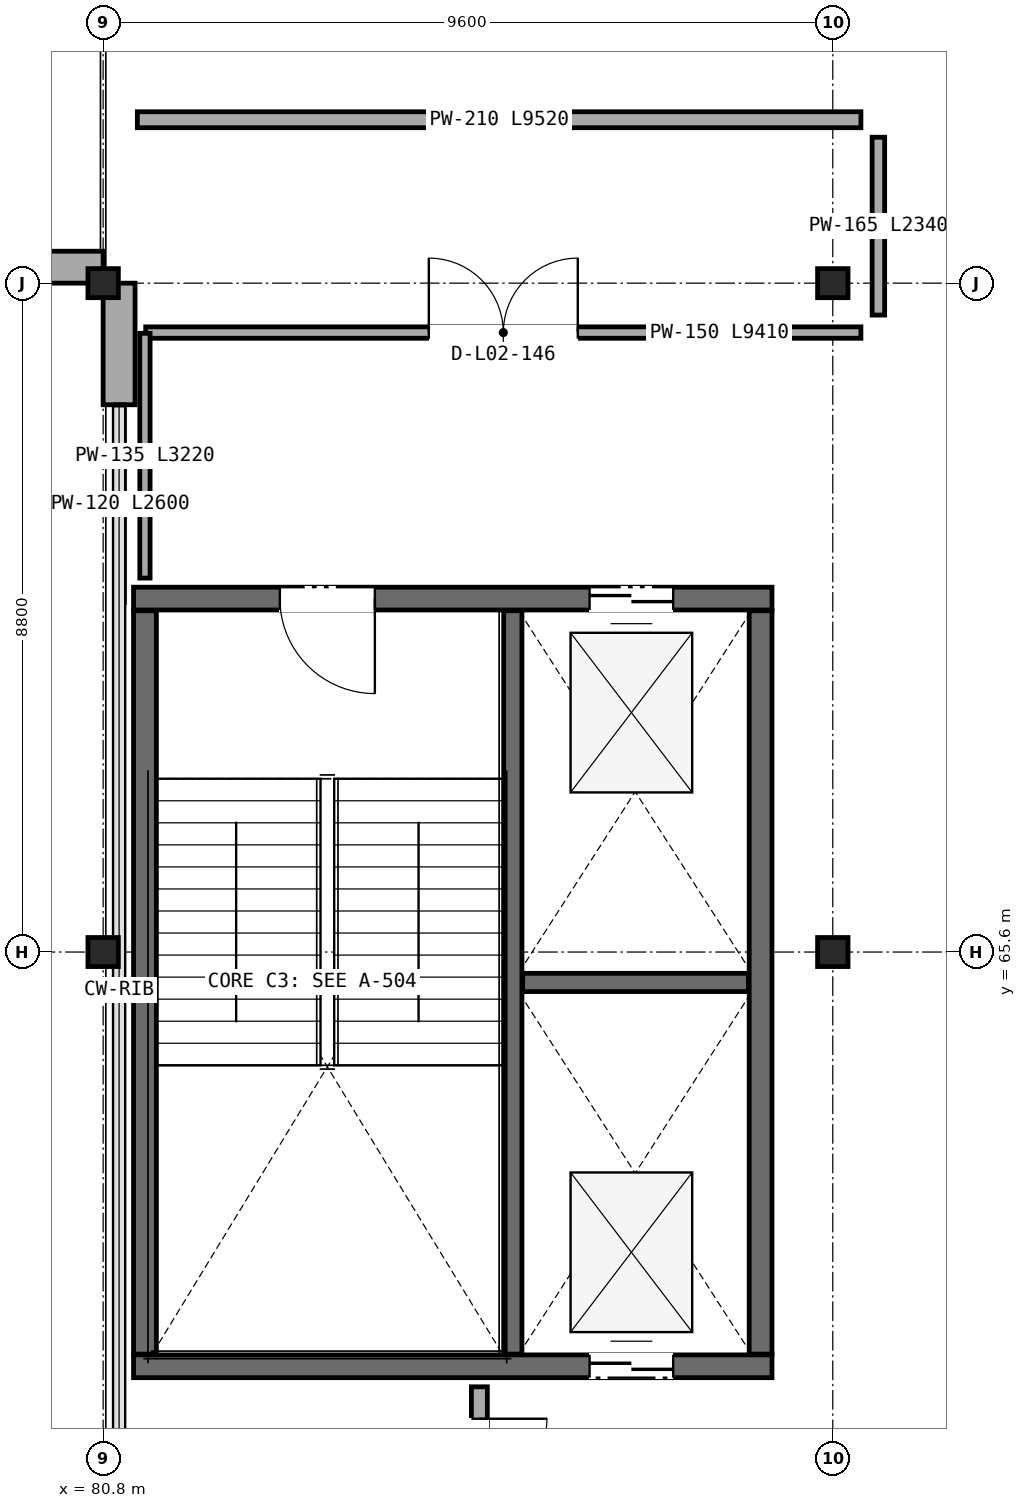
"""IFC4 building model, lengths in metres.
Left out: names, types, materials, properties, quantities, classifications, styles, units other than length and angle.
Written with IfcOpenShell. Run it as: python <this file> out.ifc"""

import sys

from ifc_helpers import new_model, si_unit, direction, frame, frame_2d, origin, origin_2d, place, context, subcontext, project, spatial, rectangle, i_section, extrude, element, fill, save


model = new_model("IFC4")
c1 = context("Model", 3, precision=1e-05, world=origin(), true_north=direction((0.0, 1.0)))
c2 = subcontext(c1, "Body", "Model", "MODEL_VIEW")
j1 = project(units=[si_unit("LENGTHUNIT", "METRE"), si_unit("PLANEANGLEUNIT", "RADIAN")], contexts=[c1])
p1 = place(None, origin())
s1 = spatial("IfcSite", under=j1, at=p1, CompositionType="ELEMENT")
p2 = place(p1, origin())
s2 = spatial("IfcBuilding", under=s1, at=p2, CompositionType="ELEMENT")
p3 = place(p2, frame((0.0, 0.0, 10.1)))
s3 = spatial("IfcBuildingStorey", under=s2, at=p3, CompositionType="ELEMENT", Elevation=10.1)
for number, where, z_axis, x_axis in (
    (1, (90.4, 65.6, 0.0), (0.0, 0.0, 1.0), (1.0, 0.0, 0.0)),
    (2, (90.4, 74.4, 0.0), (0.0, 0.0, 1.0), (1.0, 0.0, 0.0)),
    (3, (80.8, 65.6, 0.0), (0.0, 0.0, 1.0), (1.0, 0.0, 0.0)),
    (4, (80.8, 74.4, 0.0), (0.0, 0.0, 1.0), (1.0, 0.0, 0.0)),
):
    element("IfcColumn", number, at=place(p3, frame(where, z_axis=z_axis, x_axis=x_axis)), inside=s3, PredefinedType="COLUMN", context=c2, shape_type="SweptSolid", body=[
        extrude(i_section(OverallWidth=0.4, OverallDepth=0.382, WebThickness=0.025, FlangeThickness=0.036, at=origin_2d()), origin(), (0.0, 0.0, 1.0), 4.5),
    ])
p4 = place(p3, frame((42.4, 74.61, 0.0), z_axis=(0.0, 0.0, 1.0), x_axis=(1.0, 0.0, 0.0)))
e5 = element("IfcWall", 5, at=p4, inside=s3, PredefinedType="SOLIDWALL", context=c2, shape_type="SweptSolid", body=[
    extrude(rectangle(XDim=38.4, YDim=0.42, at=frame_2d((19.2, 0.0))), origin(), (0.0, 0.0, 1.0), 3.588),
])
p5 = place(p4, frame((1.8, 0.0, 0.9)))
e6 = element("IfcOpeningElement", 6, at=p5, cuts=e5, PredefinedType="OPENING", context=c2, shape_type="SweptSolid", body=[
    extrude(rectangle(XDim=2.2, YDim=2.15, at=frame_2d((1.1, 1.075))), frame((0.0, 0.22, 0.0), z_axis=(0.0, -1.0, 0.0), x_axis=(1.0, 0.0, 0.0)), (0.0, 0.0, 1.0), 0.44),
])
p6 = place(p4, frame((6.4, 0.0, 0.9)))
e7 = element("IfcOpeningElement", 7, at=p6, cuts=e5, PredefinedType="OPENING", context=c2, shape_type="SweptSolid", body=[
    extrude(rectangle(XDim=2.52, YDim=2.15, at=frame_2d((1.26, 1.075))), frame((0.0, 0.22, 0.0), z_axis=(0.0, -1.0, 0.0), x_axis=(1.0, 0.0, 0.0)), (0.0, 0.0, 1.0), 0.44),
])
p7 = place(p4, frame((11.0, 0.0, 0.9)))
e8 = element("IfcOpeningElement", 8, at=p7, cuts=e5, PredefinedType="OPENING", context=c2, shape_type="SweptSolid", body=[
    extrude(rectangle(XDim=2.65, YDim=2.15, at=frame_2d((1.325, 1.075))), frame((0.0, 0.22, 0.0), z_axis=(0.0, -1.0, 0.0), x_axis=(1.0, 0.0, 0.0)), (0.0, 0.0, 1.0), 0.44),
])
p8 = place(p4, frame((15.6, 0.0, 0.75)))
e9 = element("IfcOpeningElement", 9, at=p8, cuts=e5, PredefinedType="OPENING", context=c2, shape_type="SweptSolid", body=[
    extrude(rectangle(XDim=0.95, YDim=2.5, at=frame_2d((0.475, 1.25))), frame((0.0, 0.22, 0.0), z_axis=(0.0, -1.0, 0.0), x_axis=(1.0, 0.0, 0.0)), (0.0, 0.0, 1.0), 0.44),
])
p9 = place(p4, frame((20.2, 0.0, 0.75)))
e10 = element("IfcOpeningElement", 10, at=p9, cuts=e5, PredefinedType="OPENING", context=c2, shape_type="SweptSolid", body=[
    extrude(rectangle(XDim=1.1, YDim=2.5, at=frame_2d((0.55, 1.25))), frame((0.0, 0.22, 0.0), z_axis=(0.0, -1.0, 0.0), x_axis=(1.0, 0.0, 0.0)), (0.0, 0.0, 1.0), 0.44),
])
p10 = place(p4, frame((24.8, 0.0, 0.75)))
e11 = element("IfcOpeningElement", 11, at=p10, cuts=e5, PredefinedType="OPENING", context=c2, shape_type="SweptSolid", body=[
    extrude(rectangle(XDim=1.25, YDim=2.5, at=frame_2d((0.625, 1.25))), frame((0.0, 0.22, 0.0), z_axis=(0.0, -1.0, 0.0), x_axis=(1.0, 0.0, 0.0)), (0.0, 0.0, 1.0), 0.44),
])
p11 = place(p3, frame((81.01, 74.4, 0.0), z_axis=(0.0, 0.0, 1.0), x_axis=(0.0, -1.0, 0.0)))
e12 = element("IfcWall", 12, at=p11, inside=s3, PredefinedType="SOLIDWALL", context=c2, shape_type="SweptSolid", body=[
    extrude(rectangle(XDim=1.6, YDim=0.42, at=frame_2d((0.8, 0.0))), origin(), (0.0, 0.0, 1.0), 3.628),
])
p12 = place(p3, frame((81.2, 60.15, 0.0), z_axis=(0.0, 0.0, 1.0), x_axis=(1.0, 0.0, 0.0)))
e13 = element("IfcWall", 13, at=p12, inside=s3, PredefinedType="SHEAR", context=c2, shape_type="SweptSolid", body=[
    extrude(rectangle(XDim=8.4, YDim=0.3, at=frame_2d((4.2, 0.0))), origin(), (0.0, 0.0, 1.0), 4.245),
])
p13 = place(p12, frame((6.0, 0.0, 0.0)))
e14 = element("IfcOpeningElement", 14, at=p13, cuts=e13, PredefinedType="OPENING", context=c2, shape_type="SweptSolid", body=[
    extrude(rectangle(XDim=1.1, YDim=2.2, at=frame_2d((0.55, 1.1))), frame((0.0, 0.16, 0.0), z_axis=(0.0, -1.0, 0.0), x_axis=(1.0, 0.0, 0.0)), (0.0, 0.0, 1.0), 0.32),
])
p14 = place(p3, frame((89.6, 70.25, 0.0), z_axis=(0.0, 0.0, 1.0), x_axis=(-1.0, 0.0, 0.0)))
e15 = element("IfcWall", 15, at=p14, inside=s3, PredefinedType="SHEAR", context=c2, shape_type="SweptSolid", body=[
    extrude(rectangle(XDim=8.4, YDim=0.3, at=frame_2d((4.2, 0.0))), origin(), (0.0, 0.0, 1.0), 4.245),
])
p15 = place(p14, frame((5.225, 0.0, 0.0)))
e16 = element("IfcOpeningElement", 16, at=p15, cuts=e15, PredefinedType="OPENING", context=c2, shape_type="SweptSolid", body=[
    extrude(rectangle(XDim=1.25, YDim=2.2, at=frame_2d((0.625, 1.1))), frame((0.0, 0.16, 0.0), z_axis=(0.0, -1.0, 0.0), x_axis=(1.0, 0.0, 0.0)), (0.0, 0.0, 1.0), 0.32),
])
p16 = place(p14, frame((1.3, 0.0, 0.0)))
e17 = element("IfcOpeningElement", 17, at=p16, cuts=e15, PredefinedType="OPENING", context=c2, shape_type="SweptSolid", body=[
    extrude(rectangle(XDim=1.1, YDim=2.2, at=frame_2d((0.55, 1.1))), frame((0.0, 0.16, 0.0), z_axis=(0.0, -1.0, 0.0), x_axis=(1.0, 0.0, 0.0)), (0.0, 0.0, 1.0), 0.32),
])
for number, where, z_axis, x_axis in (
    (18, (89.45, 60.31, 0.0), (0.0, 0.0, 1.0), (0.0, 1.0, 0.0)),
    (19, (81.35, 70.09, 0.0), (0.0, 0.0, 1.0), (0.0, -1.0, 0.0)),
):
    element("IfcWall", number, at=place(p3, frame(where, z_axis=z_axis, x_axis=x_axis)), inside=s3, PredefinedType="SHEAR", context=c2, shape_type="SweptSolid", body=[
        extrude(rectangle(XDim=9.78, YDim=0.3, at=frame_2d((4.89, 0.0))), origin(), (0.0, 0.0, 1.0), 4.245),
    ])
p17 = place(p3, frame((86.19, 60.31, 0.0), z_axis=(0.0, 0.0, 1.0), x_axis=(0.0, 1.0, 0.0)))
e20 = element("IfcWall", 20, at=p17, inside=s3, PredefinedType="SOLIDWALL", context=c2, shape_type="SweptSolid", body=[
    extrude(rectangle(XDim=9.78, YDim=0.24, at=frame_2d((4.89, 0.0))), origin(), (0.0, 0.0, 1.0), 4.245),
])
p18 = place(p3, frame((86.32, 65.2, 0.0), z_axis=(0.0, 0.0, 1.0), x_axis=(1.0, 0.0, 0.0)))
e21 = element("IfcWall", 21, at=p18, inside=s3, PredefinedType="SOLIDWALL", context=c2, shape_type="SweptSolid", body=[
    extrude(rectangle(XDim=2.97, YDim=0.24, at=frame_2d((1.485, 0.0))), origin(), (0.0, 0.0, 1.0), 4.245),
])
p19 = place(p3, frame((85.75, 59.88, 0.0), z_axis=(0.0, 0.0, 1.0), x_axis=(0.0, -1.0, 0.0)))
e22 = element("IfcWall", 22, at=p19, inside=s3, PredefinedType="PARTITIONING", context=c2, shape_type="SweptSolid", body=[
    extrude(rectangle(XDim=2.62, YDim=0.21, at=frame_2d((1.31, 0.0))), origin(), (0.0, 0.0, 1.0), 4.13),
])
p20 = place(p19, frame((0.42, 0.0, 0.0)))
e23 = element("IfcOpeningElement", 23, at=p20, cuts=e22, PredefinedType="OPENING", context=c2, shape_type="SweptSolid", body=[
    extrude(rectangle(XDim=1.78, YDim=2.46, at=frame_2d((0.89, 1.23))), frame((0.0, 0.115, 0.0), z_axis=(0.0, -1.0, 0.0), x_axis=(1.0, 0.0, 0.0)), (0.0, 0.0, 1.0), 0.23),
])
p21 = place(p3, frame((91.0, 76.32, 0.0), z_axis=(0.0, 0.0, 1.0), x_axis=(0.0, -1.0, 0.0)))
e24 = element("IfcWall", 24, at=p21, inside=s3, PredefinedType="PARTITIONING", context=c2, shape_type="SweptSolid", body=[
    extrude(rectangle(XDim=2.34, YDim=0.165, at=frame_2d((1.17, 0.0))), origin(), (0.0, 0.0, 1.0), 4.13),
])
p22 = place(p3, frame((90.77, 73.75, 0.0), z_axis=(0.0, 0.0, 1.0), x_axis=(-1.0, 0.0, 0.0)))
e25 = element("IfcWall", 25, at=p22, inside=s3, PredefinedType="PARTITIONING", context=c2, shape_type="SweptSolid", body=[
    extrude(rectangle(XDim=9.41, YDim=0.15, at=frame_2d((4.705, 0.0))), origin(), (0.0, 0.0, 1.0), 3.763),
])
p23 = place(p22, frame((3.725, 0.0, 0.0)))
e26 = element("IfcOpeningElement", 26, at=p23, cuts=e25, PredefinedType="OPENING", context=c2, shape_type="SweptSolid", body=[
    extrude(rectangle(XDim=1.96, YDim=2.46, at=frame_2d((0.98, 1.23))), frame((0.0, 0.085, 0.0), z_axis=(0.0, -1.0, 0.0), x_axis=(1.0, 0.0, 0.0)), (0.0, 0.0, 1.0), 0.17),
])
p24 = place(p3, frame((81.35, 73.74, 0.0), z_axis=(0.0, 0.0, 1.0), x_axis=(0.0, -1.0, 0.0)))
e27 = element("IfcWall", 27, at=p24, inside=s3, PredefinedType="PARTITIONING", context=c2, shape_type="SweptSolid", body=[
    extrude(rectangle(XDim=3.22, YDim=0.135, at=frame_2d((1.61, 0.0))), origin(), (0.0, 0.0, 1.0), 4.13),
])
p25 = place(p3, frame((81.02, 70.2, 0.0), z_axis=(0.0, 0.0, 1.0), x_axis=(0.0, 1.0, 0.0)))
e28 = element("IfcWall", 28, at=p25, inside=s3, PredefinedType="PARTITIONING", context=c2, shape_type="SweptSolid", body=[
    extrude(rectangle(XDim=2.6, YDim=0.12, at=frame_2d((1.3, 0.0))), origin(), (0.0, 0.0, 1.0), 2.9),
])
p26 = place(p3, frame((81.25, 76.55, 0.0), z_axis=(0.0, 0.0, 1.0), x_axis=(1.0, 0.0, 0.0)))
e29 = element("IfcWall", 29, at=p26, inside=s3, PredefinedType="PARTITIONING", context=c2, shape_type="SweptSolid", body=[
    extrude(rectangle(XDim=9.52, YDim=0.21, at=frame_2d((4.76, 0.0))), origin(), (0.0, 0.0, 1.0), 3.763),
])
p27 = place(p15, origin())
e30 = element("IfcDoor", 30, at=p27, inside=s3, OperationType="SINGLE_SWING_LEFT", PredefinedType="DOOR", context=c2, shape_type="SweptSolid", body=[
    extrude(rectangle(XDim=1.25, YDim=2.2, at=frame_2d((0.625, 1.1))), frame((0.0, 0.025, 0.0), z_axis=(0.0, -1.0, 0.0), x_axis=(1.0, 0.0, 0.0)), (0.0, 0.0, 1.0), 0.05),
])
fill(e16, e30)
p28 = place(p13, origin())
e31 = element("IfcDoor", 31, at=p28, inside=s3, OperationType="DOUBLE_DOOR_SLIDING", PredefinedType="DOOR", context=c2, shape_type="SweptSolid", body=[
    extrude(rectangle(XDim=1.1, YDim=2.2, at=frame_2d((0.55, 1.1))), frame((0.0, 0.025, 0.0), z_axis=(0.0, -1.0, 0.0), x_axis=(1.0, 0.0, 0.0)), (0.0, 0.0, 1.0), 0.05),
])
fill(e14, e31)
p29 = place(p16, origin())
e32 = element("IfcDoor", 32, at=p29, inside=s3, OperationType="DOUBLE_DOOR_SLIDING", PredefinedType="DOOR", context=c2, shape_type="SweptSolid", body=[
    extrude(rectangle(XDim=1.1, YDim=2.2, at=frame_2d((0.55, 1.1))), frame((0.0, 0.025, 0.0), z_axis=(0.0, -1.0, 0.0), x_axis=(1.0, 0.0, 0.0)), (0.0, 0.0, 1.0), 0.05),
])
fill(e17, e32)
p30 = place(p20, origin())
e33 = element("IfcDoor", 33, at=p30, inside=s3, OperationType="DOUBLE_DOOR_SINGLE_SWING", PredefinedType="DOOR", context=c2, shape_type="SweptSolid", body=[
    extrude(rectangle(XDim=1.78, YDim=2.46, at=frame_2d((0.89, 1.23))), frame((0.0, 0.025, 0.0), z_axis=(0.0, -1.0, 0.0), x_axis=(1.0, 0.0, 0.0)), (0.0, 0.0, 1.0), 0.05),
])
fill(e23, e33)
p31 = place(p23, frame((1.96, 0.0, 0.0), z_axis=(0.0, 0.0, 1.0), x_axis=(-1.0, 0.0, 0.0)))
e34 = element("IfcDoor", 34, at=p31, inside=s3, OperationType="DOUBLE_DOOR_SINGLE_SWING", PredefinedType="DOOR", context=c2, shape_type="SweptSolid", body=[
    extrude(rectangle(XDim=1.96, YDim=2.46, at=frame_2d((0.98, 1.23))), frame((0.0, 0.025, 0.0), z_axis=(0.0, -1.0, 0.0), x_axis=(1.0, 0.0, 0.0)), (0.0, 0.0, 1.0), 0.05),
])
fill(e26, e34)
save(model, sys.argv[1])
